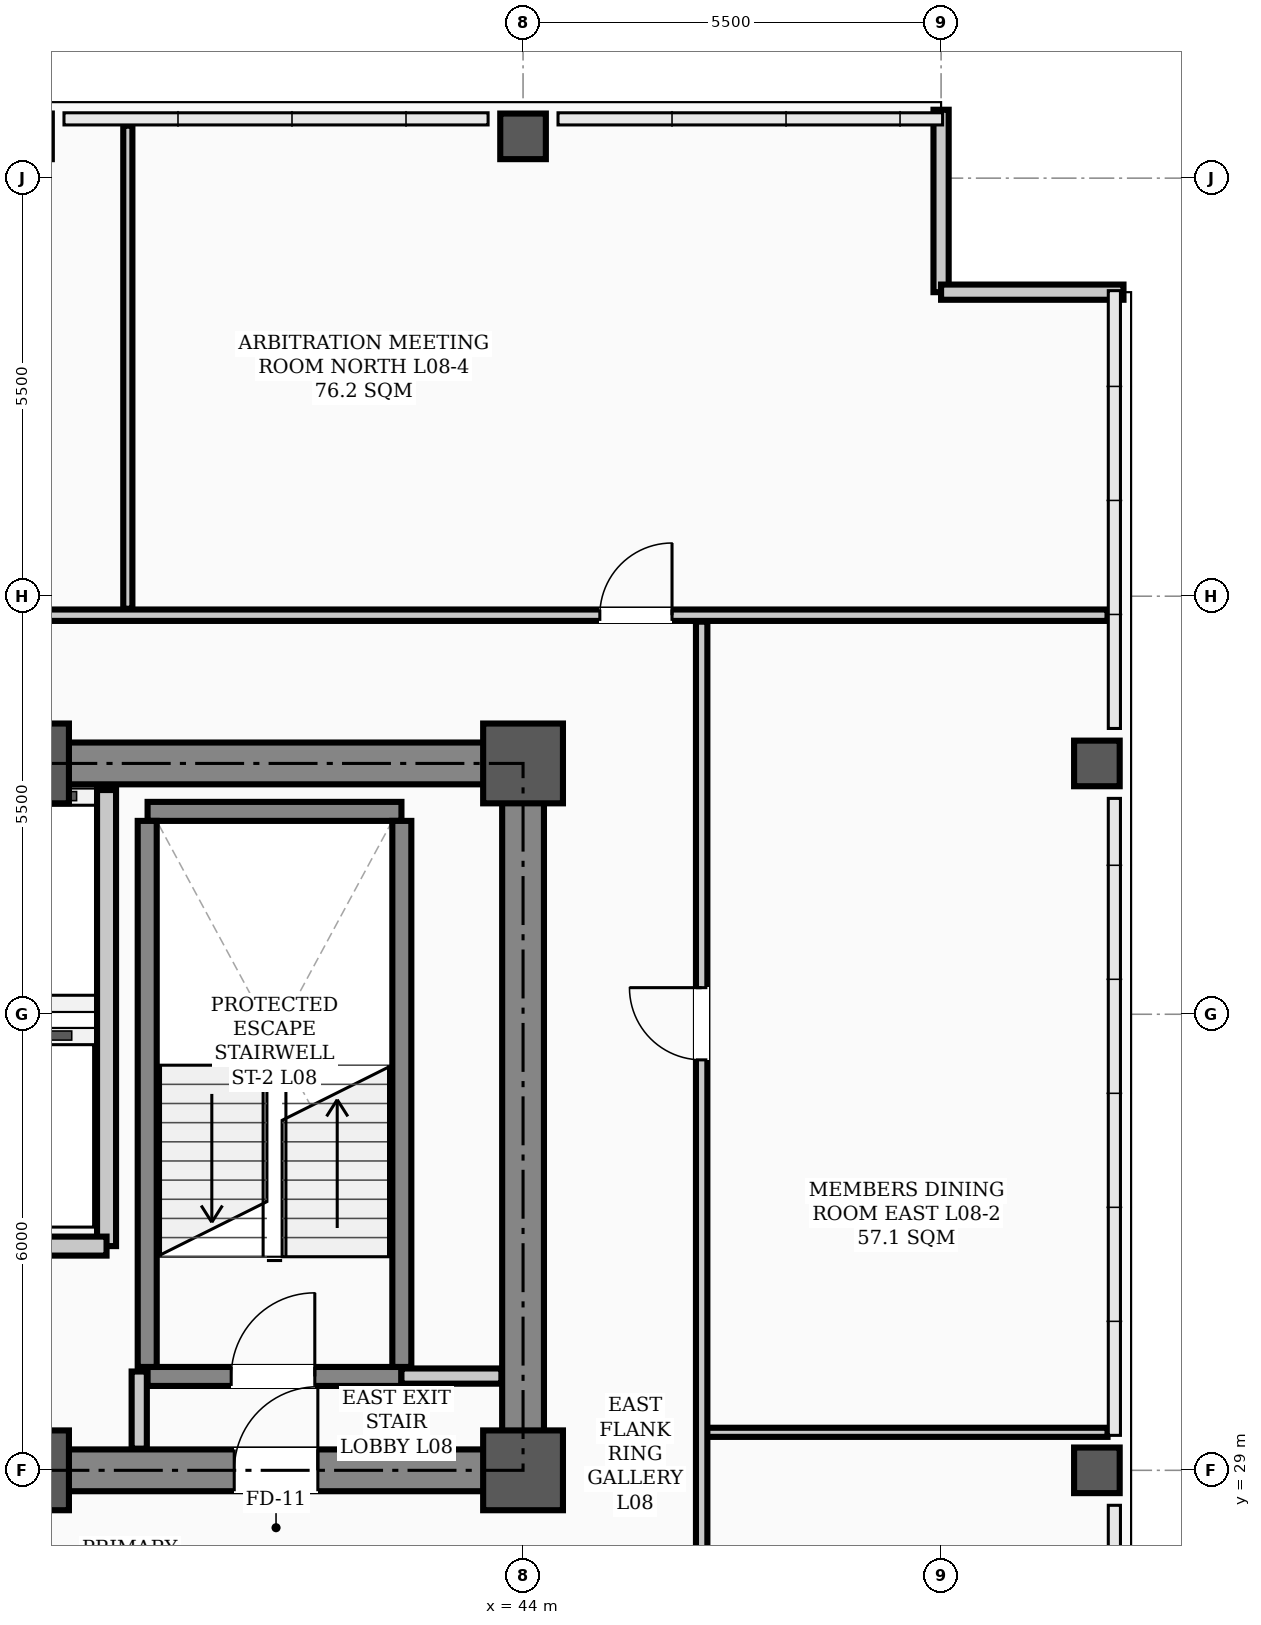
"""IFC4 building model, lengths in metres.
Left out: names, types, materials, properties, quantities, classifications, styles, units other than length and angle.
Written with IfcOpenShell. Run it as: python <this file> out.ifc"""

import sys

from ifc_helpers import new_model, si_unit, direction, frame, frame_2d, origin, origin_2d, place, context, subcontext, project, spatial, rectangle, hollow_rectangle, extrude, element, fill, save


model = new_model("IFC4")
c1 = context("Model", 3, precision=1e-05, world=origin(), true_north=direction((0.0, 1.0)))
c2 = subcontext(c1, "Body", "Model", "MODEL_VIEW")
j1 = project(units=[si_unit("LENGTHUNIT", "METRE"), si_unit("PLANEANGLEUNIT", "RADIAN")], contexts=[c1])
p1 = place(None, origin())
s1 = spatial("IfcSite", under=j1, at=p1, CompositionType="ELEMENT")
p2 = place(p1, origin())
s2 = spatial("IfcBuilding", under=s1, at=p2, CompositionType="ELEMENT")
p3 = place(p2, frame((0.0, 0.0, 34.3)))
s3 = spatial("IfcBuildingStorey", under=s2, at=p3, CompositionType="ELEMENT", Elevation=34.3)
for number, where, z_axis, x_axis in (
    (1, (37.5, 29.0, 0.0), (0.0, 0.0, 1.0), (1.0, 0.0, 0.0)),
    (2, (37.5, 38.3, 0.0), (0.0, 0.0, 1.0), (1.0, 0.0, 0.0)),
    (3, (44.0, 29.0, 0.0), (0.0, 0.0, 1.0), (1.0, 0.0, 0.0)),
    (4, (44.0, 38.3, 0.0), (0.0, 0.0, 1.0), (1.0, 0.0, 0.0)),
):
    element("IfcColumn", number, at=place(p3, frame(where, z_axis=z_axis, x_axis=x_axis)), inside=s3, PredefinedType="COLUMN", context=c2, shape_type="SweptSolid", body=[
        extrude(hollow_rectangle(XDim=1.05, YDim=1.05, WallThickness=0.038, InnerFilletRadius=0.019, OuterFilletRadius=0.057, at=origin_2d()), origin(), (0.0, 0.0, 1.0), 3.9),
    ])
for number, where, z_axis, x_axis in (
    (5, (44.0, 46.55, 0.0), (0.0, 0.0, 1.0), (1.0, 0.0, 0.0)),
    (6, (51.55, 29.0, 0.0), (0.0, 0.0, 1.0), (1.0, 0.0, 0.0)),
    (7, (51.55, 38.3, 0.0), (0.0, 0.0, 1.0), (1.0, 0.0, 0.0)),
):
    element("IfcColumn", number, at=place(p3, frame(where, z_axis=z_axis, x_axis=x_axis)), inside=s3, PredefinedType="COLUMN", context=c2, shape_type="SweptSolid", body=[
        extrude(hollow_rectangle(XDim=0.6, YDim=0.6, WallThickness=0.026, InnerFilletRadius=0.013, OuterFilletRadius=0.039, at=origin_2d()), origin(), (0.0, 0.0, 1.0), 3.9),
    ])
for number, where, z_axis, x_axis in (
    (8, (49.5, 46.9, 0.0), (0.0, 0.0, 1.0), (0.0, -1.0, 0.0)),
    (9, (49.5, 44.5, 0.0), (0.0, 0.0, 1.0), (1.0, 0.0, 0.0)),
):
    element("IfcWall", number, at=place(p3, frame(where, z_axis=z_axis, x_axis=x_axis)), inside=s3, PredefinedType="PARAPET", context=c2, shape_type="SweptSolid", body=[
        extrude(rectangle(XDim=2.4, YDim=0.2, at=frame_2d((1.2, 0.0))), origin(), (0.0, 0.0, 1.0), 1.2),
    ])
p4 = place(p3, frame((13.5, 29.0, 0.0), z_axis=(0.0, 0.0, 1.0), x_axis=(1.0, 0.0, 0.0)))
e10 = element("IfcWall", 10, at=p4, inside=s3, PredefinedType="SHEAR", context=c2, shape_type="SweptSolid", body=[
    extrude(rectangle(XDim=30.5, YDim=0.55, at=frame_2d((15.25, 0.0))), origin(), (0.0, 0.0, 1.0), 3.72),
])
p5 = place(p4, frame((1.75, 0.0, 0.0)))
e11 = element("IfcOpeningElement", 11, at=p5, cuts=e10, PredefinedType="OPENING", context=c2, shape_type="SweptSolid", body=[
    extrude(rectangle(XDim=1.1, YDim=2.08, at=frame_2d((0.55, 1.04))), frame((0.0, 0.285, 0.0), z_axis=(0.0, -1.0, 0.0), x_axis=(1.0, 0.0, 0.0)), (0.0, 0.0, 1.0), 0.57),
])
p6 = place(p4, frame((26.7, 0.0, 0.0)))
e12 = element("IfcOpeningElement", 12, at=p6, cuts=e10, PredefinedType="OPENING", context=c2, shape_type="SweptSolid", body=[
    extrude(rectangle(XDim=1.1, YDim=2.08, at=frame_2d((0.55, 1.04))), frame((0.0, 0.285, 0.0), z_axis=(0.0, -1.0, 0.0), x_axis=(1.0, 0.0, 0.0)), (0.0, 0.0, 1.0), 0.57),
])
p7 = place(p4, frame((6.8, 0.0, 0.0)))
e13 = element("IfcOpeningElement", 13, at=p7, cuts=e10, PredefinedType="OPENING", context=c2, shape_type="SweptSolid", body=[
    extrude(rectangle(XDim=1.1, YDim=2.08, at=frame_2d((0.55, 1.04))), frame((0.0, 0.285, 0.0), z_axis=(0.0, -1.0, 0.0), x_axis=(1.0, 0.0, 0.0)), (0.0, 0.0, 1.0), 0.57),
])
p8 = place(p4, frame((13.2, 0.0, 0.0)))
e14 = element("IfcOpeningElement", 14, at=p8, cuts=e10, PredefinedType="OPENING", context=c2, shape_type="SweptSolid", body=[
    extrude(rectangle(XDim=1.6, YDim=2.08, at=frame_2d((0.8, 1.04))), frame((0.0, 0.285, 0.0), z_axis=(0.0, -1.0, 0.0), x_axis=(1.0, 0.0, 0.0)), (0.0, 0.0, 1.0), 0.57),
])
p9 = place(p4, frame((19.53, 0.0, 0.0)))
e15 = element("IfcOpeningElement", 15, at=p9, cuts=e10, PredefinedType="OPENING", context=c2, shape_type="SweptSolid", body=[
    extrude(rectangle(XDim=0.9, YDim=2.08, at=frame_2d((0.45, 1.04))), frame((0.0, 0.285, 0.0), z_axis=(0.0, -1.0, 0.0), x_axis=(1.0, 0.0, 0.0)), (0.0, 0.0, 1.0), 0.57),
])
p10 = place(p4, frame((21.57, 0.0, 0.0)))
e16 = element("IfcOpeningElement", 16, at=p10, cuts=e10, PredefinedType="OPENING", context=c2, shape_type="SweptSolid", body=[
    extrude(rectangle(XDim=0.9, YDim=2.08, at=frame_2d((0.45, 1.04))), frame((0.0, 0.285, 0.0), z_axis=(0.0, -1.0, 0.0), x_axis=(1.0, 0.0, 0.0)), (0.0, 0.0, 1.0), 0.57),
])
p11 = place(p3, frame((13.5, 38.3, 0.0), z_axis=(0.0, 0.0, 1.0), x_axis=(1.0, 0.0, 0.0)))
e17 = element("IfcWall", 17, at=p11, inside=s3, PredefinedType="SHEAR", context=c2, shape_type="SweptSolid", body=[
    extrude(rectangle(XDim=30.5, YDim=0.55, at=frame_2d((15.25, 0.0))), origin(), (0.0, 0.0, 1.0), 3.72),
])
p12 = place(p3, frame((44.0, 29.35, 0.0), z_axis=(0.0, 0.0, 1.0), x_axis=(0.0, 1.0, 0.0)))
e18 = element("IfcWall", 18, at=p12, inside=s3, PredefinedType="SHEAR", context=c2, shape_type="SweptSolid", body=[
    extrude(rectangle(XDim=8.6, YDim=0.55, at=frame_2d((4.3, 0.0))), origin(), (0.0, 0.0, 1.0), 3.72),
])
p13 = place(p3, frame((39.06, 30.235, 0.0), z_axis=(0.0, 0.0, 1.0), x_axis=(1.0, 0.0, 0.0)))
e19 = element("IfcWall", 19, at=p13, inside=s3, PredefinedType="STANDARD", context=c2, shape_type="SweptSolid", body=[
    extrude(rectangle(XDim=3.34, YDim=0.25, at=frame_2d((1.67, 0.0))), origin(), (0.0, 0.0, 1.0), 3.72),
])
p14 = place(p13, frame((1.1, 0.0, 0.0)))
e20 = element("IfcOpeningElement", 20, at=p14, cuts=e19, PredefinedType="OPENING", context=c2, shape_type="SweptSolid", body=[
    extrude(rectangle(XDim=1.1, YDim=2.08, at=frame_2d((0.55, 1.04))), frame((0.0, 0.135, 0.0), z_axis=(0.0, -1.0, 0.0), x_axis=(1.0, 0.0, 0.0)), (0.0, 0.0, 1.0), 0.27),
])
p15 = place(p3, frame((39.06, 37.669, 0.0), z_axis=(0.0, 0.0, 1.0), x_axis=(1.0, 0.0, 0.0)))
e21 = element("IfcWall", 21, at=p15, inside=s3, PredefinedType="STANDARD", context=c2, shape_type="SweptSolid", body=[
    extrude(rectangle(XDim=3.34, YDim=0.25, at=frame_2d((1.67, 0.0))), origin(), (0.0, 0.0, 1.0), 3.72),
])
for number, where, z_axis, x_axis in (
    (22, (39.055, 30.36, 0.0), (0.0, 0.0, 1.0), (0.0, 1.0, 0.0)),
    (23, (42.405, 30.36, 0.0), (0.0, 0.0, 1.0), (0.0, 1.0, 0.0)),
):
    element("IfcWall", number, at=place(p3, frame(where, z_axis=z_axis, x_axis=x_axis)), inside=s3, PredefinedType="STANDARD", context=c2, shape_type="SweptSolid", body=[
        extrude(rectangle(XDim=7.184, YDim=0.25, at=frame_2d((3.592, 0.0))), origin(), (0.0, 0.0, 1.0), 3.72),
    ])
p16 = place(p3, frame((38.52, 31.95, 0.0), z_axis=(0.0, 0.0, 1.0), x_axis=(0.0, 1.0, 0.0)))
e24 = element("IfcWall", 24, at=p16, inside=s3, PredefinedType="STANDARD", context=c2, shape_type="SweptSolid", body=[
    extrude(rectangle(XDim=6.0, YDim=0.25, at=frame_2d((3.0, 0.0))), origin(), (0.0, 0.0, 1.0), 3.3),
])
p17 = place(p3, frame((36.62, 31.95, 0.0), z_axis=(0.0, 0.0, 1.0), x_axis=(1.0, 0.0, 0.0)))
e25 = element("IfcWall", 25, at=p17, inside=s3, PredefinedType="STANDARD", context=c2, shape_type="SweptSolid", body=[
    extrude(rectangle(XDim=1.9, YDim=0.25, at=frame_2d((0.95, 0.0))), origin(), (0.0, 0.0, 1.0), 3.48),
])
p18 = place(p3, frame((42.4, 30.24, 0.0), z_axis=(0.0, 0.0, 1.0), x_axis=(1.0, 0.0, 0.0)))
e26 = element("IfcWall", 26, at=p18, inside=s3, PredefinedType="STANDARD", context=c2, shape_type="SweptSolid", body=[
    extrude(rectangle(XDim=1.315, YDim=0.2, at=frame_2d((0.658, 0.0))), origin(), (0.0, 0.0, 1.0), 3.1),
])
p19 = place(p3, frame((46.35, 29.5, 0.0), z_axis=(0.0, 0.0, 1.0), x_axis=(1.0, 0.0, 0.0)))
e27 = element("IfcWall", 27, at=p19, inside=s3, PredefinedType="PARTITIONING", context=c2, shape_type="SweptSolid", body=[
    extrude(rectangle(XDim=5.34, YDim=0.12, at=frame_2d((2.67, 0.0))), origin(), (0.0, 0.0, 1.0), 3.0),
])
p20 = place(p3, frame((2.31, 40.25, 0.0), z_axis=(0.0, 0.0, 1.0), x_axis=(1.0, 0.0, 0.0)))
e28 = element("IfcWall", 28, at=p20, inside=s3, PredefinedType="PARTITIONING", context=c2, shape_type="SweptSolid", body=[
    extrude(rectangle(XDim=49.38, YDim=0.15, at=frame_2d((24.69, 0.0))), origin(), (0.0, 0.0, 1.0), 3.1),
])
p21 = place(p20, frame((9.23, 0.0, 0.0)))
e29 = element("IfcOpeningElement", 29, at=p21, cuts=e28, PredefinedType="OPENING", context=c2, shape_type="SweptSolid", body=[
    extrude(rectangle(XDim=0.95, YDim=2.08, at=frame_2d((0.475, 1.04))), frame((0.0, 0.085, 0.0), z_axis=(0.0, -1.0, 0.0), x_axis=(1.0, 0.0, 0.0)), (0.0, 0.0, 1.0), 0.17),
])
p22 = place(p20, frame((23.115, 0.0, 0.0)))
e30 = element("IfcOpeningElement", 30, at=p22, cuts=e28, PredefinedType="OPENING", context=c2, shape_type="SweptSolid", body=[
    extrude(rectangle(XDim=0.95, YDim=2.08, at=frame_2d((0.475, 1.04))), frame((0.0, 0.085, 0.0), z_axis=(0.0, -1.0, 0.0), x_axis=(1.0, 0.0, 0.0)), (0.0, 0.0, 1.0), 0.17),
])
p23 = place(p20, frame((31.515, 0.0, 0.0)))
e31 = element("IfcOpeningElement", 31, at=p23, cuts=e28, PredefinedType="OPENING", context=c2, shape_type="SweptSolid", body=[
    extrude(rectangle(XDim=0.95, YDim=2.08, at=frame_2d((0.475, 1.04))), frame((0.0, 0.085, 0.0), z_axis=(0.0, -1.0, 0.0), x_axis=(1.0, 0.0, 0.0)), (0.0, 0.0, 1.0), 0.17),
])
p24 = place(p20, frame((42.7, 0.0, 0.0)))
e32 = element("IfcOpeningElement", 32, at=p24, cuts=e28, PredefinedType="OPENING", context=c2, shape_type="SweptSolid", body=[
    extrude(rectangle(XDim=0.95, YDim=2.08, at=frame_2d((0.475, 1.04))), frame((0.0, 0.085, 0.0), z_axis=(0.0, -1.0, 0.0), x_axis=(1.0, 0.0, 0.0)), (0.0, 0.0, 1.0), 0.17),
])
p25 = place(p3, frame((38.95, 29.285, 0.0), z_axis=(0.0, 0.0, 1.0), x_axis=(0.0, 1.0, 0.0)))
e33 = element("IfcWall", 33, at=p25, inside=s3, PredefinedType="STANDARD", context=c2, shape_type="SweptSolid", body=[
    extrude(rectangle(XDim=1.015, YDim=0.2, at=frame_2d((0.508, 0.0))), origin(), (0.0, 0.0, 1.0), 3.3),
])
p26 = place(p3, frame((46.35, 17.635, 0.0), z_axis=(0.0, 0.0, 1.0), x_axis=(0.0, 1.0, 0.0)))
e34 = element("IfcWall", 34, at=p26, inside=s3, PredefinedType="PARTITIONING", context=c2, shape_type="SweptSolid", body=[
    extrude(rectangle(XDim=22.53, YDim=0.15, at=frame_2d((11.265, 0.0))), origin(), (0.0, 0.0, 1.0), 3.0),
])
p27 = place(p26, frame((5.415, 0.0, 0.0)))
e35 = element("IfcOpeningElement", 35, at=p27, cuts=e34, PredefinedType="OPENING", context=c2, shape_type="SweptSolid", body=[
    extrude(rectangle(XDim=0.95, YDim=2.08, at=frame_2d((0.475, 1.04))), frame((0.0, 0.085, 0.0), z_axis=(0.0, -1.0, 0.0), x_axis=(1.0, 0.0, 0.0)), (0.0, 0.0, 1.0), 0.17),
])
p28 = place(p26, frame((16.765, 0.0, 0.0)))
e36 = element("IfcOpeningElement", 36, at=p28, cuts=e34, PredefinedType="OPENING", context=c2, shape_type="SweptSolid", body=[
    extrude(rectangle(XDim=0.95, YDim=2.08, at=frame_2d((0.475, 1.04))), frame((0.0, 0.085, 0.0), z_axis=(0.0, -1.0, 0.0), x_axis=(1.0, 0.0, 0.0)), (0.0, 0.0, 1.0), 0.17),
])
p29 = place(p3, frame((38.8, 40.335, 0.0), z_axis=(0.0, 0.0, 1.0), x_axis=(0.0, 1.0, 0.0)))
e37 = element("IfcWall", 37, at=p29, inside=s3, PredefinedType="PARTITIONING", context=c2, shape_type="SweptSolid", body=[
    extrude(rectangle(XDim=6.355, YDim=0.12, at=frame_2d((3.177, 0.0))), origin(), (0.0, 0.0, 1.0), 3.212),
])
p30 = place(p14, origin())
e38 = element("IfcDoor", 38, at=p30, inside=s3, OperationType="SINGLE_SWING_RIGHT", PredefinedType="DOOR", context=c2, shape_type="SweptSolid", body=[
    extrude(rectangle(XDim=1.1, YDim=2.08, at=frame_2d((0.55, 1.04))), frame((0.0, 0.025, 0.0), z_axis=(0.0, -1.0, 0.0), x_axis=(1.0, 0.0, 0.0)), (0.0, 0.0, 1.0), 0.05),
])
fill(e20, e38)
p31 = place(p6, origin())
e39 = element("IfcDoor", 39, at=p31, inside=s3, OperationType="SINGLE_SWING_RIGHT", PredefinedType="DOOR", context=c2, shape_type="SweptSolid", body=[
    extrude(rectangle(XDim=1.1, YDim=2.08, at=frame_2d((0.55, 1.04))), frame((0.0, 0.025, 0.0), z_axis=(0.0, -1.0, 0.0), x_axis=(1.0, 0.0, 0.0)), (0.0, 0.0, 1.0), 0.05),
])
fill(e12, e39)
p32 = place(p28, origin())
e40 = element("IfcDoor", 40, at=p32, inside=s3, OperationType="SINGLE_SWING_RIGHT", PredefinedType="DOOR", context=c2, shape_type="SweptSolid", body=[
    extrude(rectangle(XDim=0.95, YDim=2.08, at=frame_2d((0.475, 1.04))), frame((0.0, 0.025, 0.0), z_axis=(0.0, -1.0, 0.0), x_axis=(1.0, 0.0, 0.0)), (0.0, 0.0, 1.0), 0.05),
])
fill(e36, e40)
p33 = place(p24, origin())
e41 = element("IfcDoor", 41, at=p33, inside=s3, OperationType="SINGLE_SWING_RIGHT", PredefinedType="DOOR", context=c2, shape_type="SweptSolid", body=[
    extrude(rectangle(XDim=0.95, YDim=2.08, at=frame_2d((0.475, 1.04))), frame((0.0, 0.025, 0.0), z_axis=(0.0, -1.0, 0.0), x_axis=(1.0, 0.0, 0.0)), (0.0, 0.0, 1.0), 0.05),
])
fill(e32, e41)
save(model, sys.argv[1])
